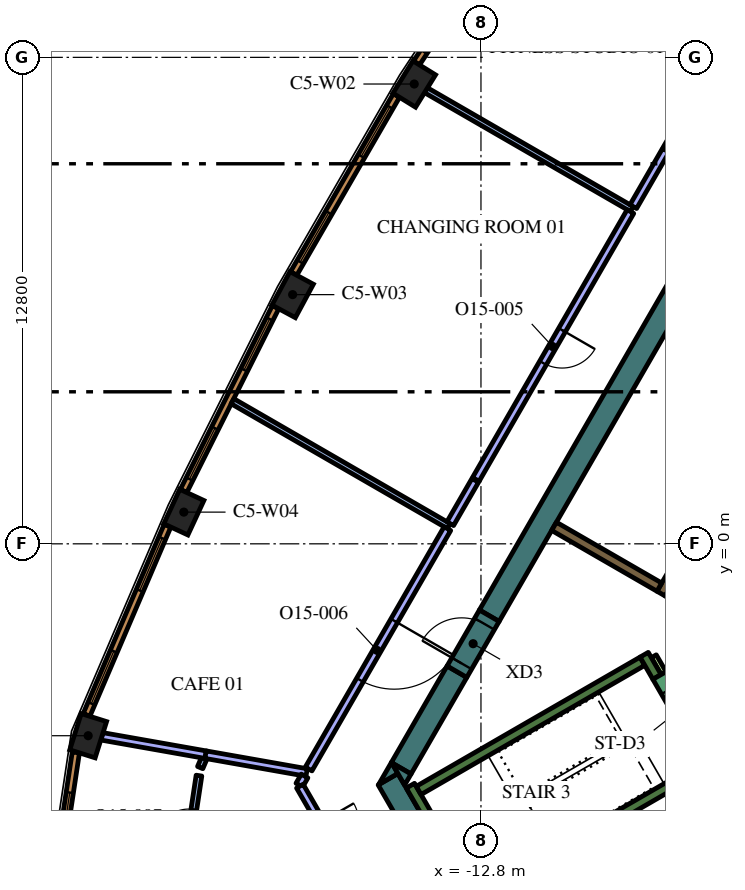
"""IFC4 building model, lengths in metres.
Left out: names, types, materials, properties, quantities, classifications, styles, units other than length and angle.
Written with IfcOpenShell. Run it as: python <this file> out.ifc"""

import sys

from ifc_helpers import new_model, si_unit, direction, frame, frame_2d, origin, origin_2d, place, context, subcontext, project, spatial, polyline, rectangle, outline, extrude, element, fill, save


model = new_model("IFC4")
c1 = context("Model", 3, precision=1e-05, world=origin(), true_north=direction((0.0, 1.0)))
c2 = subcontext(c1, "Body", "Model", "MODEL_VIEW")
j1 = project(units=[si_unit("LENGTHUNIT", "METRE"), si_unit("PLANEANGLEUNIT", "RADIAN")], contexts=[c1])
p1 = place(None, origin())
s1 = spatial("IfcSite", under=j1, at=p1, CompositionType="ELEMENT")
p2 = place(p1, origin())
s2 = spatial("IfcBuilding", under=s1, at=p2, CompositionType="ELEMENT")
p3 = place(p2, frame((0.0, 0.0, 317.4)))
s3 = spatial("IfcBuildingStorey", under=s2, at=p3, CompositionType="ELEMENT", Elevation=317.4)
for number, where, z_axis, x_axis in (
    (1, (-14.556, 12.098, 0.0), (0.0, 0.0, 1.0), (-0.526, -0.851, 0.0)),
    (2, (-17.756, 6.557, 0.0), (0.0, 0.0, 1.0), (-0.474, -0.881, 0.0)),
    (3, (-20.619, 0.834, 0.0), (0.0, 0.0, 1.0), (-0.421, -0.907, 0.0)),
    (4, (-23.136, -5.049, 0.0), (0.0, 0.0, 1.0), (-0.3, -0.954, 0.0)),
):
    element("IfcColumn", number, at=place(p3, frame(where, z_axis=z_axis, x_axis=x_axis)), inside=s3, PredefinedType="COLUMN", context=c2, shape_type="SweptSolid", body=[
        extrude(rectangle(XDim=1.0, YDim=0.7, at=origin_2d()), origin(), (0.0, 0.0, 1.0), 4.2),
    ])
p4 = place(p3, frame((-13.333, -9.506, 0.0), z_axis=(0.0, 0.0, 1.0), x_axis=(-0.500019073792, 0.866014391245, 0.0)))
e5 = element("IfcWall", 5, at=p4, inside=s3, PredefinedType="SOLIDWALL", context=c2, shape_type="SweptSolid", body=[
    extrude(rectangle(XDim=3.823, YDim=0.6, at=frame_2d((1.912, 0.0))), origin(), (0.0, 0.0, 1.0), 4.2),
])
p5 = place(p3, origin())
e6 = element("IfcWall", 6, at=p5, inside=s3, PredefinedType="SOLIDWALL", context=c2, shape_type="SweptSolid", body=[
    extrude(outline(polyline([(-14.987, -6.043), (-15.493, -6.335), (-15.156, -5.75), (-14.987, -6.043)])), origin(), (0.0, 0.0, 1.0), 4.2),
])
p6 = place(p3, frame((-13.432, -3.364, 0.0), z_axis=(0.0, 0.0, 1.0), x_axis=(-0.499960127962, -0.866048422692, 0.0)))
e7 = element("IfcWall", 7, at=p6, inside=s3, PredefinedType="SOLIDWALL", context=c2, shape_type="SweptSolid", body=[
    extrude(rectangle(XDim=2.934, YDim=0.6, at=frame_2d((1.467, 0.0))), origin(), (0.0, 0.0, 1.0), 4.2),
])
e8 = element("IfcWall", 8, at=p5, inside=s3, PredefinedType="SOLIDWALL", context=c2, shape_type="SweptSolid", body=[
    extrude(outline(polyline([(-14.809, -6.35), (-15.147, -5.764), (-14.64, -6.057), (-14.809, -6.35)])), origin(), (0.0, 0.0, 1.0), 4.2),
])
p7 = place(p3, frame((-12.582, -1.892, 0.0), z_axis=(0.0, 0.0, 1.0), x_axis=(0.500003640647, 0.866023301845, 0.0)))
e9 = element("IfcWall", 9, at=p7, inside=s3, PredefinedType="SOLIDWALL", context=c2, shape_type="SweptSolid", body=[
    extrude(rectangle(XDim=15.858, YDim=0.6, at=frame_2d((7.929, 0.0))), origin(), (0.0, 0.0, 1.0), 4.2),
])
p8 = place(p3, frame((-12.84, -9.511, 0.0), z_axis=(0.0, 0.0, 1.0), x_axis=(-0.499997733992, 0.866026712061, 0.0)))
e10 = element("IfcWall", 10, at=p8, inside=s3, PredefinedType="SOLIDWALL", context=c2, shape_type="SweptSolid", body=[
    extrude(rectangle(XDim=3.634, YDim=0.25, at=frame_2d((1.817, 0.0))), origin(), (0.0, 0.0, 1.0), 4.2),
])
p9 = place(p3, frame((-14.44, -6.49, 0.0), z_axis=(0.0, 0.0, 1.0), x_axis=(0.866022966069, 0.500004222222, 0.0)))
e11 = element("IfcWall", 11, at=p9, inside=s3, PredefinedType="SOLIDWALL", context=c2, shape_type="SweptSolid", body=[
    extrude(rectangle(XDim=6.8, YDim=0.25, at=frame_2d((3.4, 0.0))), origin(), (0.0, 0.0, 1.0), 4.2),
])
p10 = place(p3, frame((-8.168, -3.503, 0.0), z_axis=(0.0, 0.0, 1.0), x_axis=(-0.499952099219, 0.866053057547, 0.0)))
e12 = element("IfcWall", 12, at=p10, inside=s3, PredefinedType="SOLIDWALL", context=c2, shape_type="SweptSolid", body=[
    extrude(rectangle(XDim=0.675, YDim=0.25, at=frame_2d((0.337, 0.0))), origin(), (0.0, 0.0, 1.0), 4.2),
])
p11 = place(p3, frame((-12.84, -9.261, 0.0), z_axis=(0.0, 0.0, 1.0), x_axis=(0.866016039709, 0.500016218704, 0.0)))
e13 = element("IfcWall", 13, at=p11, inside=s3, PredefinedType="SOLIDWALL", context=c2, shape_type="SweptSolid", body=[
    extrude(rectangle(XDim=7.05, YDim=0.25, at=frame_2d((3.525, 0.0))), origin(), (0.0, 0.0, 1.0), 4.2),
])
p12 = place(p3, frame((-8.06, -1.311, 0.0), z_axis=(0.0, 0.0, 1.0), x_axis=(0.50000273126, 0.866023826885, 0.0)))
e14 = element("IfcWall", 14, at=p12, inside=s3, PredefinedType="SOLIDWALL", context=c2, shape_type="SweptSolid", body=[
    extrude(rectangle(XDim=10.33, YDim=0.25, at=frame_2d((5.165, 0.0))), origin(), (0.0, 0.0, 1.0), 4.2),
])
p13 = place(p3, frame((-8.106, -1.14, 0.0), z_axis=(0.0, 0.0, 1.0), x_axis=(-0.866008981251, 0.500028443584, 0.0)))
e15 = element("IfcWall", 15, at=p13, inside=s3, PredefinedType="SOLIDWALL", context=c2, shape_type="SweptSolid", body=[
    extrude(rectangle(XDim=3.2, YDim=0.25, at=frame_2d((1.6, 0.0))), origin(), (0.0, 0.0, 1.0), 4.2),
])
p14 = place(p3, frame((-8.252, -2.958, 0.0), z_axis=(0.0, 0.0, 1.0), x_axis=(0.500174715838, -0.865924508047, 0.0)))
e16 = element("IfcWall", 16, at=p14, inside=s3, PredefinedType="PARTITIONING", context=c2, shape_type="SweptSolid", body=[
    extrude(rectangle(XDim=0.514, YDim=0.15, at=frame_2d((0.257, 0.0))), origin(), (0.0, 0.0, 1.0), 3.5),
])
p15 = place(p3, frame((-8.103, -3.466, 0.0), z_axis=(0.0, 0.0, 1.0), x_axis=(0.500078061341, -0.865980330357, 0.0)))
e17 = element("IfcWall", 17, at=p15, inside=s3, PredefinedType="SOLIDWALL", context=c2, shape_type="SweptSolid", body=[
    extrude(rectangle(XDim=2.1, YDim=0.4, at=frame_2d((1.05, 0.0))), origin(), (0.0, 0.0, 1.0), 4.2),
])
p16 = place(p15, frame((0.45, 0.0, 0.0)))
e18 = element("IfcOpeningElement", 18, at=p16, cuts=e17, PredefinedType="OPENING", context=c2, shape_type="SweptSolid", body=[
    extrude(rectangle(XDim=1.2, YDim=2.1, at=frame_2d((0.6, 1.05))), frame((0.0, 0.21, 0.0), z_axis=(0.0, -1.0, 0.0), x_axis=(1.0, 0.0, 0.0)), (0.0, 0.0, 1.0), 0.42),
])
p17 = place(p3, frame((-13.432, -3.364, 0.0), z_axis=(0.0, 0.0, 1.0), x_axis=(0.500062241894, 0.865989465428, 0.0)))
e19 = element("IfcWall", 19, at=p17, inside=s3, PredefinedType="SOLIDWALL", context=c2, shape_type="SweptSolid", body=[
    extrude(rectangle(XDim=1.7, YDim=0.6, at=frame_2d((0.85, 0.0))), origin(), (0.0, 0.0, 1.0), 4.2),
])
p18 = place(p17, frame((0.25, 0.0, 0.0)))
e20 = element("IfcOpeningElement", 20, at=p18, cuts=e19, PredefinedType="OPENING", context=c2, shape_type="SweptSolid", body=[
    extrude(rectangle(XDim=1.2, YDim=2.1, at=frame_2d((0.6, 1.05))), frame((0.0, 0.31, 0.0), z_axis=(0.0, -1.0, 0.0), x_axis=(1.0, 0.0, 0.0)), (0.0, 0.0, 1.0), 0.62),
])
p19 = place(p3, frame((-8.829, 8.808, 0.0), z_axis=(0.0, 0.0, 1.0), x_axis=(-0.86603673505, 0.499980373158, 0.0)))
e21 = element("IfcWall", 21, at=p19, inside=s3, PredefinedType="PARTITIONING", context=c2, shape_type="SweptSolid", body=[
    extrude(rectangle(XDim=6.255, YDim=0.15, at=frame_2d((3.127, 0.0))), origin(), (0.0, 0.0, 1.0), 3.5),
])
p20 = place(p3, frame((-7.936, 10.355, 0.0), z_axis=(0.0, 0.0, 1.0), x_axis=(-0.500035209441, -0.86600507465, 0.0)))
e22 = element("IfcWall", 22, at=p20, inside=s3, PredefinedType="PARTITIONING", context=c2, shape_type="SweptSolid", body=[
    extrude(rectangle(XDim=1.712, YDim=0.2, at=frame_2d((0.856, 0.0))), origin(), (0.0, 0.0, 1.0), 3.5),
])
p21 = place(p3, frame((-3.523, 17.998, 0.0), z_axis=(0.0, 0.0, 1.0), x_axis=(-0.499996383721, -0.866027491634, 0.0)))
e23 = element("IfcWall", 23, at=p21, inside=s3, PredefinedType="PARTITIONING", context=c2, shape_type="SweptSolid", body=[
    extrude(rectangle(XDim=8.795, YDim=0.2, at=frame_2d((4.397, 0.0))), origin(), (0.0, 0.0, 1.0), 3.5),
])
p22 = place(p21, frame((3.9, 0.0, 0.0)))
e24 = element("IfcOpeningElement", 24, at=p22, cuts=e23, PredefinedType="OPENING", context=c2, shape_type="SweptSolid", body=[
    extrude(rectangle(XDim=1.0, YDim=2.1, at=frame_2d((0.5, 1.05))), frame((0.0, 0.11, 0.0), z_axis=(0.0, -1.0, 0.0), x_axis=(1.0, 0.0, 0.0)), (0.0, 0.0, 1.0), 0.22),
])
p23 = place(p3, frame((-13.646, 0.465, 0.0), z_axis=(0.0, 0.0, 1.0), x_axis=(-0.866033427365, 0.499986102494, 0.0)))
e25 = element("IfcWall", 25, at=p23, inside=s3, PredefinedType="PARTITIONING", context=c2, shape_type="SweptSolid", body=[
    extrude(rectangle(XDim=6.573, YDim=0.15, at=frame_2d((3.287, 0.0))), origin(), (0.0, 0.0, 1.0), 3.5),
])
p24 = place(p3, frame((-8.867, 8.743, 0.0), z_axis=(0.0, 0.0, 1.0), x_axis=(-0.499978679558, -0.866037712797, 0.0)))
e26 = element("IfcWall", 26, at=p24, inside=s3, PredefinedType="PARTITIONING", context=c2, shape_type="SweptSolid", body=[
    extrude(rectangle(XDim=8.138, YDim=0.2, at=frame_2d((4.069, 0.0))), origin(), (0.0, 0.0, 1.0), 3.5),
])
p25 = place(p24, frame((3.6, 0.0, 0.0)))
e27 = element("IfcOpeningElement", 27, at=p25, cuts=e26, PredefinedType="OPENING", context=c2, shape_type="SweptSolid", body=[
    extrude(rectangle(XDim=1.0, YDim=2.1, at=frame_2d((0.5, 1.05))), frame((0.0, 0.11, 0.0), z_axis=(0.0, -1.0, 0.0), x_axis=(1.0, 0.0, 0.0)), (0.0, 0.0, 1.0), 0.22),
])
p26 = place(p3, frame((-12.951, 1.669, 0.0), z_axis=(0.0, 0.0, 1.0), x_axis=(-0.49987242464, -0.866099046925, 0.0)))
e28 = element("IfcWall", 28, at=p26, inside=s3, PredefinedType="PARTITIONING", context=c2, shape_type="SweptSolid", body=[
    extrude(rectangle(XDim=1.315, YDim=0.2, at=frame_2d((0.658, 0.0))), origin(), (0.0, 0.0, 1.0), 3.5),
])
p27 = place(p3, frame((-20.039, -5.549, 0.0), z_axis=(0.0, 0.0, 1.0), x_axis=(-0.984771168486, 0.173855531173, 0.0)))
e29 = element("IfcWall", 29, at=p27, inside=s3, PredefinedType="PARTITIONING", context=c2, shape_type="SweptSolid", body=[
    extrude(rectangle(XDim=2.778, YDim=0.2, at=frame_2d((1.389, 0.0))), origin(), (0.0, 0.0, 1.0), 3.5),
])
p28 = place(p3, frame((-17.388, -6.017, 0.0), z_axis=(0.0, 0.0, 1.0), x_axis=(-0.984769902927, 0.173862699534, 0.0)))
e30 = element("IfcWall", 30, at=p28, inside=s3, PredefinedType="PARTITIONING", context=c2, shape_type="SweptSolid", body=[
    extrude(rectangle(XDim=2.7, YDim=0.2, at=frame_2d((1.35, 0.0))), origin(), (0.0, 0.0, 1.0), 3.5),
])
p29 = place(p3, frame((-13.683, 0.4, 0.0), z_axis=(0.0, 0.0, 1.0), x_axis=(-0.500004109969, -0.86602303088, 0.0)))
e31 = element("IfcWall", 31, at=p29, inside=s3, PredefinedType="PARTITIONING", context=c2, shape_type="SweptSolid", body=[
    extrude(rectangle(XDim=7.303, YDim=0.2, at=frame_2d((3.652, 0.0))), origin(), (0.0, 0.0, 1.0), 3.5),
])
p30 = place(p29, frame((2.8, 0.0, 0.0)))
e32 = element("IfcOpeningElement", 32, at=p30, cuts=e31, PredefinedType="OPENING", context=c2, shape_type="SweptSolid", body=[
    extrude(rectangle(XDim=1.8, YDim=2.1, at=frame_2d((0.9, 1.05))), frame((0.0, 0.11, 0.0), z_axis=(0.0, -1.0, 0.0), x_axis=(1.0, 0.0, 0.0)), (0.0, 0.0, 1.0), 0.22),
])
p31 = place(p3, frame((-20.083, -5.643, 0.0), z_axis=(0.0, 0.0, 1.0), x_axis=(-0.392924203078, -0.919570862215, 0.0)))
e33 = element("IfcWall", 33, at=p31, inside=s3, PredefinedType="PARTITIONING", context=c2, shape_type="SweptSolid", body=[
    extrude(rectangle(XDim=0.267, YDim=0.15, at=frame_2d((0.133, 0.0))), origin(), (0.0, 0.0, 1.0), 3.5),
])
p32 = place(p3, frame((-20.638, -8.867, 0.0), z_axis=(0.0, 0.0, 1.0), x_axis=(0.149402322172, 0.988776489471, 0.0)))
e34 = element("IfcWall", 34, at=p32, inside=s3, PredefinedType="PARTITIONING", context=c2, shape_type="SweptSolid", body=[
    extrude(rectangle(XDim=2.799, YDim=0.15, at=frame_2d((1.4, 0.0))), origin(), (0.0, 0.0, 1.0), 3.5),
])
p33 = place(p32, frame((0.999, 0.0, 0.0)))
e35 = element("IfcOpeningElement", 35, at=p33, cuts=e34, PredefinedType="OPENING", context=c2, shape_type="SweptSolid", body=[
    extrude(rectangle(XDim=0.9, YDim=2.1, at=frame_2d((0.45, 1.05))), frame((0.0, 0.085, 0.0), z_axis=(0.0, -1.0, 0.0), x_axis=(1.0, 0.0, 0.0)), (0.0, 0.0, 1.0), 0.17),
])
p34 = place(p3, frame((-17.441, -6.109, 0.0), z_axis=(0.0, 0.0, 1.0), x_axis=(-0.500102178127, -0.865966403178, 0.0)))
e36 = element("IfcWall", 36, at=p34, inside=s3, PredefinedType="PARTITIONING", context=c2, shape_type="SweptSolid", body=[
    extrude(rectangle(XDim=0.278, YDim=0.2, at=frame_2d((0.139, 0.0))), origin(), (0.0, 0.0, 1.0), 3.5),
])
p35 = place(p3, frame((-17.565, -6.376, 0.0), z_axis=(0.0, 0.0, 1.0), x_axis=(0.499963479838, -0.866046487683, 0.0)))
e37 = element("IfcWall", 37, at=p35, inside=s3, PredefinedType="PARTITIONING", context=c2, shape_type="SweptSolid", body=[
    extrude(rectangle(XDim=3.186, YDim=0.2, at=frame_2d((1.593, 0.0))), origin(), (0.0, 0.0, 1.0), 3.5),
])
p36 = place(p35, frame((1.1, 0.0, 0.0)))
e38 = element("IfcOpeningElement", 38, at=p36, cuts=e37, PredefinedType="OPENING", context=c2, shape_type="SweptSolid", body=[
    extrude(rectangle(XDim=1.0, YDim=2.1, at=frame_2d((0.5, 1.05))), frame((0.0, 0.11, 0.0), z_axis=(0.0, -1.0, 0.0), x_axis=(1.0, 0.0, 0.0)), (0.0, 0.0, 1.0), 0.22),
])
p37 = place(p3, frame((-11.518, 17.166, 0.0), z_axis=(0.0, 0.0, 1.0), x_axis=(-0.550744054781, -0.83467417962, 0.0)))
e39 = element("IfcWall", 39, at=p37, inside=s3, PredefinedType="SOLIDWALL", context=c2, shape_type="SweptSolid", body=[
    extrude(rectangle(XDim=5.406, YDim=0.19, at=frame_2d((2.703, 0.0))), origin(), (0.0, 0.0, 1.0), 3.9),
])
p38 = place(p37, frame((0.346, 0.0, 0.6)))
e40 = element("IfcOpeningElement", 40, at=p38, cuts=e39, PredefinedType="OPENING", context=c2, shape_type="SweptSolid", body=[
    extrude(rectangle(XDim=1.5, YDim=2.85, at=frame_2d((0.75, 1.425))), frame((0.0, 0.105, 0.0), z_axis=(0.0, -1.0, 0.0), x_axis=(1.0, 0.0, 0.0)), (0.0, 0.0, 1.0), 0.21),
])
p39 = place(p37, frame((3.559, 0.0, 0.6)))
e41 = element("IfcOpeningElement", 41, at=p39, cuts=e39, PredefinedType="OPENING", context=c2, shape_type="SweptSolid", body=[
    extrude(rectangle(XDim=1.5, YDim=2.85, at=frame_2d((0.75, 1.425))), frame((0.0, 0.105, 0.0), z_axis=(0.0, -1.0, 0.0), x_axis=(1.0, 0.0, 0.0)), (0.0, 0.0, 1.0), 0.21),
])
p40 = place(p3, frame((-15.025, 11.796, 0.0), z_axis=(0.0, 0.0, 1.0), x_axis=(-0.500024767483, -0.866011103799, 0.0)))
e42 = element("IfcWall", 42, at=p40, inside=s3, PredefinedType="SOLIDWALL", context=c2, shape_type="SweptSolid", body=[
    extrude(rectangle(XDim=5.406, YDim=0.19, at=frame_2d((2.703, 0.0))), origin(), (0.0, 0.0, 1.0), 3.9),
])
p41 = place(p40, frame((0.346, 0.0, 0.6)))
e43 = element("IfcOpeningElement", 43, at=p41, cuts=e42, PredefinedType="OPENING", context=c2, shape_type="SweptSolid", body=[
    extrude(rectangle(XDim=1.5, YDim=2.85, at=frame_2d((0.75, 1.425))), frame((0.0, 0.105, 0.0), z_axis=(0.0, -1.0, 0.0), x_axis=(1.0, 0.0, 0.0)), (0.0, 0.0, 1.0), 0.21),
])
p42 = place(p40, frame((3.559, 0.0, 0.6)))
e44 = element("IfcOpeningElement", 44, at=p42, cuts=e42, PredefinedType="OPENING", context=c2, shape_type="SweptSolid", body=[
    extrude(rectangle(XDim=1.5, YDim=2.85, at=frame_2d((0.75, 1.425))), frame((0.0, 0.105, 0.0), z_axis=(0.0, -1.0, 0.0), x_axis=(1.0, 0.0, 0.0)), (0.0, 0.0, 1.0), 0.21),
])
p43 = place(p3, frame((-18.206, 6.227, 0.0), z_axis=(0.0, 0.0, 1.0), x_axis=(-0.447484531401, -0.894291671747, 0.0)))
e45 = element("IfcWall", 45, at=p43, inside=s3, PredefinedType="SOLIDWALL", context=c2, shape_type="SweptSolid", body=[
    extrude(rectangle(XDim=5.406, YDim=0.19, at=frame_2d((2.703, 0.0))), origin(), (0.0, 0.0, 1.0), 3.9),
])
p44 = place(p43, frame((0.346, 0.0, 0.6)))
e46 = element("IfcOpeningElement", 46, at=p44, cuts=e45, PredefinedType="OPENING", context=c2, shape_type="SweptSolid", body=[
    extrude(rectangle(XDim=1.5, YDim=2.85, at=frame_2d((0.75, 1.425))), frame((0.0, 0.105, 0.0), z_axis=(0.0, -1.0, 0.0), x_axis=(1.0, 0.0, 0.0)), (0.0, 0.0, 1.0), 0.21),
])
p45 = place(p43, frame((3.559, 0.0, 0.6)))
e47 = element("IfcOpeningElement", 47, at=p45, cuts=e45, PredefinedType="OPENING", context=c2, shape_type="SweptSolid", body=[
    extrude(rectangle(XDim=1.5, YDim=2.85, at=frame_2d((0.75, 1.425))), frame((0.0, 0.105, 0.0), z_axis=(0.0, -1.0, 0.0), x_axis=(1.0, 0.0, 0.0)), (0.0, 0.0, 1.0), 0.21),
])
p46 = place(p3, frame((-21.049, 0.478, 0.0), z_axis=(0.0, 0.0, 1.0), x_axis=(-0.393347848476, -0.919389726992, 0.0)))
e48 = element("IfcWall", 48, at=p46, inside=s3, PredefinedType="SOLIDWALL", context=c2, shape_type="SweptSolid", body=[
    extrude(rectangle(XDim=5.415, YDim=0.19, at=frame_2d((2.708, 0.0))), origin(), (0.0, 0.0, 1.0), 3.9),
])
p47 = place(p46, frame((0.357, 0.0, 0.6)))
e49 = element("IfcOpeningElement", 49, at=p47, cuts=e48, PredefinedType="OPENING", context=c2, shape_type="SweptSolid", body=[
    extrude(rectangle(XDim=1.5, YDim=2.85, at=frame_2d((0.75, 1.425))), frame((0.0, 0.105, 0.0), z_axis=(0.0, -1.0, 0.0), x_axis=(1.0, 0.0, 0.0)), (0.0, 0.0, 1.0), 0.21),
])
p48 = place(p46, frame((3.593, 0.0, 0.6)))
e50 = element("IfcOpeningElement", 50, at=p48, cuts=e48, PredefinedType="OPENING", context=c2, shape_type="SweptSolid", body=[
    extrude(rectangle(XDim=1.5, YDim=2.85, at=frame_2d((0.75, 1.425))), frame((0.0, 0.105, 0.0), z_axis=(0.0, -1.0, 0.0), x_axis=(1.0, 0.0, 0.0)), (0.0, 0.0, 1.0), 0.21),
])
p49 = place(p3, frame((-23.46, -5.488, 0.0), z_axis=(0.0, 0.0, 1.0), x_axis=(-0.149421055602, -0.988773658702, 0.0)))
e51 = element("IfcWall", 51, at=p49, inside=s3, PredefinedType="SOLIDWALL", context=c2, shape_type="SweptSolid", body=[
    extrude(rectangle(XDim=3.237, YDim=0.19, at=frame_2d((1.618, 0.0))), origin(), (0.0, 0.0, 1.0), 3.9),
])
p50 = place(p49, frame((1.068, 0.0, 0.6)))
e52 = element("IfcOpeningElement", 52, at=p50, cuts=e51, PredefinedType="OPENING", context=c2, shape_type="SweptSolid", body=[
    extrude(rectangle(XDim=1.1, YDim=2.85, at=frame_2d((0.55, 1.425))), frame((0.0, 0.105, 0.0), z_axis=(0.0, -1.0, 0.0), x_axis=(1.0, 0.0, 0.0)), (0.0, 0.0, 1.0), 0.21),
])
p51 = place(p18, origin())
e53 = element("IfcDoor", 53, at=p51, inside=s3, OperationType="SINGLE_SWING_LEFT", PredefinedType="DOOR", context=c2, shape_type="SweptSolid", body=[
    extrude(rectangle(XDim=1.2, YDim=2.1, at=frame_2d((0.6, 1.05))), frame((0.0, 0.025, 0.0), z_axis=(0.0, -1.0, 0.0), x_axis=(1.0, 0.0, 0.0)), (0.0, 0.0, 1.0), 0.05),
])
fill(e20, e53)
p52 = place(p25, origin())
e54 = element("IfcDoor", 54, at=p52, inside=s3, OperationType="SINGLE_SWING_RIGHT", PredefinedType="DOOR", context=c2, shape_type="SweptSolid", body=[
    extrude(rectangle(XDim=1.0, YDim=2.1, at=frame_2d((0.5, 1.05))), frame((0.0, 0.025, 0.0), z_axis=(0.0, -1.0, 0.0), x_axis=(1.0, 0.0, 0.0)), (0.0, 0.0, 1.0), 0.05),
])
fill(e27, e54)
p53 = place(p30, origin())
e55 = element("IfcDoor", 55, at=p53, inside=s3, OperationType="DOUBLE_DOOR_SINGLE_SWING", PredefinedType="DOOR", context=c2, shape_type="SweptSolid", body=[
    extrude(rectangle(XDim=1.8, YDim=2.1, at=frame_2d((0.9, 1.05))), frame((0.0, 0.025, 0.0), z_axis=(0.0, -1.0, 0.0), x_axis=(1.0, 0.0, 0.0)), (0.0, 0.0, 1.0), 0.05),
])
fill(e32, e55)
p54 = place(p33, origin())
e56 = element("IfcDoor", 56, at=p54, inside=s3, OperationType="SINGLE_SWING_RIGHT", PredefinedType="DOOR", context=c2, shape_type="SweptSolid", body=[
    extrude(rectangle(XDim=0.9, YDim=2.1, at=frame_2d((0.45, 1.05))), frame((0.0, 0.025, 0.0), z_axis=(0.0, -1.0, 0.0), x_axis=(1.0, 0.0, 0.0)), (0.0, 0.0, 1.0), 0.05),
])
fill(e35, e56)
p55 = place(p39, origin())
e57 = element("IfcWindow", 57, at=p55, inside=s3, PartitioningType="SINGLE_PANEL", PredefinedType="WINDOW", context=c2, shape_type="SweptSolid", body=[
    extrude(rectangle(XDim=1.5, YDim=2.85, at=frame_2d((0.75, 1.425))), frame((0.0, 0.045, 0.0), z_axis=(0.0, -1.0, 0.0), x_axis=(1.0, 0.0, 0.0)), (0.0, 0.0, 1.0), 0.06),
])
fill(e41, e57)
p56 = place(p41, origin())
e58 = element("IfcWindow", 58, at=p56, inside=s3, PartitioningType="SINGLE_PANEL", PredefinedType="WINDOW", context=c2, shape_type="SweptSolid", body=[
    extrude(rectangle(XDim=1.5, YDim=2.85, at=frame_2d((0.75, 1.425))), frame((0.0, 0.045, 0.0), z_axis=(0.0, -1.0, 0.0), x_axis=(1.0, 0.0, 0.0)), (0.0, 0.0, 1.0), 0.06),
])
fill(e43, e58)
p57 = place(p42, origin())
e59 = element("IfcWindow", 59, at=p57, inside=s3, PartitioningType="SINGLE_PANEL", PredefinedType="WINDOW", context=c2, shape_type="SweptSolid", body=[
    extrude(rectangle(XDim=1.5, YDim=2.85, at=frame_2d((0.75, 1.425))), frame((0.0, 0.045, 0.0), z_axis=(0.0, -1.0, 0.0), x_axis=(1.0, 0.0, 0.0)), (0.0, 0.0, 1.0), 0.06),
])
fill(e44, e59)
p58 = place(p44, origin())
e60 = element("IfcWindow", 60, at=p58, inside=s3, PartitioningType="SINGLE_PANEL", PredefinedType="WINDOW", context=c2, shape_type="SweptSolid", body=[
    extrude(rectangle(XDim=1.5, YDim=2.85, at=frame_2d((0.75, 1.425))), frame((0.0, 0.045, 0.0), z_axis=(0.0, -1.0, 0.0), x_axis=(1.0, 0.0, 0.0)), (0.0, 0.0, 1.0), 0.06),
])
fill(e46, e60)
p59 = place(p45, origin())
e61 = element("IfcWindow", 61, at=p59, inside=s3, PartitioningType="SINGLE_PANEL", PredefinedType="WINDOW", context=c2, shape_type="SweptSolid", body=[
    extrude(rectangle(XDim=1.5, YDim=2.85, at=frame_2d((0.75, 1.425))), frame((0.0, 0.045, 0.0), z_axis=(0.0, -1.0, 0.0), x_axis=(1.0, 0.0, 0.0)), (0.0, 0.0, 1.0), 0.06),
])
fill(e47, e61)
p60 = place(p47, origin())
e62 = element("IfcWindow", 62, at=p60, inside=s3, PartitioningType="SINGLE_PANEL", PredefinedType="WINDOW", context=c2, shape_type="SweptSolid", body=[
    extrude(rectangle(XDim=1.5, YDim=2.85, at=frame_2d((0.75, 1.425))), frame((0.0, 0.045, 0.0), z_axis=(0.0, -1.0, 0.0), x_axis=(1.0, 0.0, 0.0)), (0.0, 0.0, 1.0), 0.06),
])
fill(e49, e62)
p61 = place(p48, origin())
e63 = element("IfcWindow", 63, at=p61, inside=s3, PartitioningType="SINGLE_PANEL", PredefinedType="WINDOW", context=c2, shape_type="SweptSolid", body=[
    extrude(rectangle(XDim=1.5, YDim=2.85, at=frame_2d((0.75, 1.425))), frame((0.0, 0.045, 0.0), z_axis=(0.0, -1.0, 0.0), x_axis=(1.0, 0.0, 0.0)), (0.0, 0.0, 1.0), 0.06),
])
fill(e50, e63)
p62 = place(p50, origin())
e64 = element("IfcWindow", 64, at=p62, inside=s3, PartitioningType="SINGLE_PANEL", PredefinedType="WINDOW", context=c2, shape_type="SweptSolid", body=[
    extrude(rectangle(XDim=1.1, YDim=2.85, at=frame_2d((0.55, 1.425))), frame((0.0, 0.045, 0.0), z_axis=(0.0, -1.0, 0.0), x_axis=(1.0, 0.0, 0.0)), (0.0, 0.0, 1.0), 0.06),
])
fill(e52, e64)
save(model, sys.argv[1])
